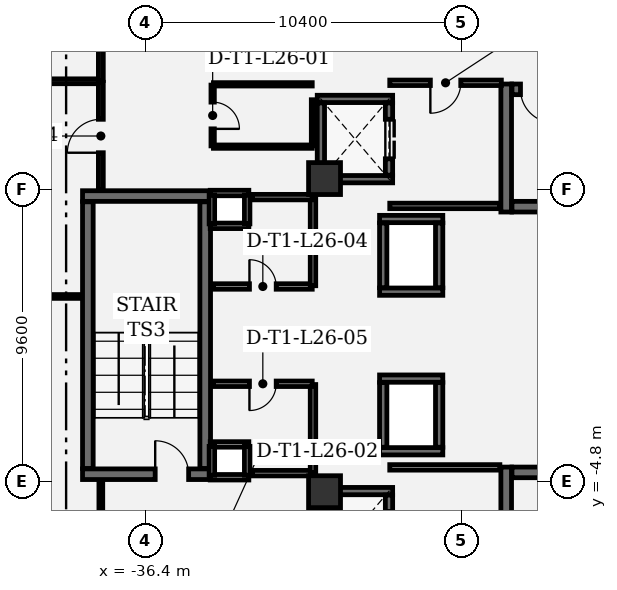
"""IFC4 building model, lengths in metres.
Left out: names, types, materials, properties, quantities, classifications, styles, units other than length and angle.
Written with IfcOpenShell. Run it as: python <this file> out.ifc"""

import sys

from ifc_helpers import new_model, si_unit, direction, frame, frame_2d, origin, origin_2d, place, context, subcontext, project, spatial, rectangle, extrude, element, fill, save


model = new_model("IFC4")
c1 = context("Model", 3, precision=1e-05, world=origin(), true_north=direction((0.0, 1.0)))
c2 = subcontext(c1, "Body", "Model", "MODEL_VIEW")
j1 = project(units=[si_unit("LENGTHUNIT", "METRE"), si_unit("PLANEANGLEUNIT", "RADIAN")], contexts=[c1])
p1 = place(None, origin())
s1 = spatial("IfcSite", under=j1, at=p1, CompositionType="ELEMENT")
p2 = place(p1, origin())
s2 = spatial("IfcBuilding", under=s1, at=p2, CompositionType="ELEMENT")
p3 = place(p2, frame((0.0, 0.0, 117.9)))
s3 = spatial("IfcBuildingStorey", under=s2, at=p3, CompositionType="ELEMENT", Elevation=117.9)
for number, where, z_axis, x_axis in (
    (1, (-30.5, 5.15, 0.0), (0.0, 0.0, 1.0), (1.0, 0.0, 0.0)),
    (2, (-30.5, -5.15, 0.0), (0.0, 0.0, 1.0), (1.0, 0.0, 0.0)),
):
    element("IfcColumn", number, at=place(p3, frame(where, z_axis=z_axis, x_axis=x_axis)), inside=s3, PredefinedType="COLUMN", context=c2, shape_type="SweptSolid", body=[
        extrude(rectangle(XDim=1.05, YDim=1.05, at=origin_2d()), origin(), (0.0, 0.0, 1.0), 4.05),
    ])
p4 = place(p3, frame((-24.525, 8.26, 0.0), z_axis=(0.0, 0.0, 1.0), x_axis=(0.0, -1.0, 0.0)))
e3 = element("IfcWall", 3, at=p4, inside=s3, PredefinedType="SHEAR", context=c2, shape_type="SweptSolid", body=[
    extrude(rectangle(XDim=4.21, YDim=0.35, at=frame_2d((2.105, 0.0))), origin(), (0.0, 0.0, 1.0), 3.77),
])
p5 = place(p3, frame((-24.335, 4.225, 0.0), z_axis=(0.0, 0.0, 1.0), x_axis=(1.0, 0.0, 0.0)))
e4 = element("IfcWall", 4, at=p5, inside=s3, PredefinedType="SHEAR", context=c2, shape_type="SweptSolid", body=[
    extrude(rectangle(XDim=8.12, YDim=0.35, at=frame_2d((4.06, 0.0))), origin(), (0.0, 0.0, 1.0), 3.77),
])
p6 = place(p3, frame((-16.215, 8.085, 0.0), z_axis=(0.0, 0.0, 1.0), x_axis=(-1.0, 0.0, 0.0)))
e5 = element("IfcWall", 5, at=p6, inside=s3, PredefinedType="SHEAR", context=c2, shape_type="SweptSolid", body=[
    extrude(rectangle(XDim=8.12, YDim=0.35, at=frame_2d((4.06, 0.0))), origin(), (0.0, 0.0, 1.0), 3.77),
])
p7 = place(p6, frame((6.74, 0.0, 0.0)))
e6 = element("IfcOpeningElement", 6, at=p7, cuts=e5, PredefinedType="OPENING", context=c2, shape_type="SweptSolid", body=[
    extrude(rectangle(XDim=1.1, YDim=2.2, at=frame_2d((0.55, 1.1))), frame((0.0, 0.185, 0.0), z_axis=(0.0, -1.0, 0.0), x_axis=(1.0, 0.0, 0.0)), (0.0, 0.0, 1.0), 0.37),
])
p8 = place(p3, frame((-24.525, -4.34, 0.0), z_axis=(0.0, 0.0, 1.0), x_axis=(0.0, -1.0, 0.0)))
e7 = element("IfcWall", 7, at=p8, inside=s3, PredefinedType="SHEAR", context=c2, shape_type="SweptSolid", body=[
    extrude(rectangle(XDim=4.21, YDim=0.35, at=frame_2d((2.105, 0.0))), origin(), (0.0, 0.0, 1.0), 3.77),
])
p9 = place(p3, frame((-16.215, -4.515, 0.0), z_axis=(0.0, 0.0, 1.0), x_axis=(-1.0, 0.0, 0.0)))
e8 = element("IfcWall", 8, at=p9, inside=s3, PredefinedType="SHEAR", context=c2, shape_type="SweptSolid", body=[
    extrude(rectangle(XDim=8.12, YDim=0.35, at=frame_2d((4.06, 0.0))), origin(), (0.0, 0.0, 1.0), 3.77),
])
p10 = place(p3, frame((-38.46, -4.575, 0.0), z_axis=(0.0, 0.0, 1.0), x_axis=(1.0, 0.0, 0.0)))
e9 = element("IfcWall", 9, at=p10, inside=s3, PredefinedType="SHEAR", context=c2, shape_type="SweptSolid", body=[
    extrude(rectangle(XDim=4.21, YDim=0.35, at=frame_2d((2.105, 0.0))), origin(), (0.0, 0.0, 1.0), 3.77),
])
p11 = place(p10, frame((2.39, 0.0, 0.0)))
e10 = element("IfcOpeningElement", 10, at=p11, cuts=e9, PredefinedType="OPENING", context=c2, shape_type="SweptSolid", body=[
    extrude(rectangle(XDim=1.1, YDim=2.2, at=frame_2d((0.55, 1.1))), frame((0.0, 0.185, 0.0), z_axis=(0.0, -1.0, 0.0), x_axis=(1.0, 0.0, 0.0)), (0.0, 0.0, 1.0), 0.37),
])
p12 = place(p3, frame((-34.25, 4.575, 0.0), z_axis=(0.0, 0.0, 1.0), x_axis=(-1.0, 0.0, 0.0)))
e11 = element("IfcWall", 11, at=p12, inside=s3, PredefinedType="SHEAR", context=c2, shape_type="SweptSolid", body=[
    extrude(rectangle(XDim=4.21, YDim=0.35, at=frame_2d((2.105, 0.0))), origin(), (0.0, 0.0, 1.0), 3.77),
])
for number, where, z_axis, x_axis in (
    (12, (-34.425, -4.385, 0.0), (0.0, 0.0, 1.0), (0.0, 1.0, 0.0)),
    (13, (-38.285, 4.385, 0.0), (0.0, 0.0, 1.0), (0.0, -1.0, 0.0)),
):
    element("IfcWall", number, at=place(p3, frame(where, z_axis=z_axis, x_axis=x_axis)), inside=s3, PredefinedType="SHEAR", context=c2, shape_type="SweptSolid", body=[
        extrude(rectangle(XDim=8.77, YDim=0.35, at=frame_2d((4.385, 0.0))), origin(), (0.0, 0.0, 1.0), 3.77),
    ])
for number, where, z_axis, x_axis in (
    (14, (-28.26, 5.13, 0.0), (0.0, 0.0, 1.0), (-1.0, 0.0, 0.0)),
    (15, (-30.74, 7.77, 0.0), (0.0, 0.0, 1.0), (1.0, 0.0, 0.0)),
):
    element("IfcWall", number, at=place(p3, frame(where, z_axis=z_axis, x_axis=x_axis)), inside=s3, PredefinedType="SHEAR", context=c2, shape_type="SweptSolid", body=[
        extrude(rectangle(XDim=2.48, YDim=0.24, at=frame_2d((1.24, 0.0))), origin(), (0.0, 0.0, 1.0), 3.77),
    ])
p13 = place(p3, frame((-30.62, 5.262, 0.0), z_axis=(0.0, 0.0, 1.0), x_axis=(0.0, 1.0, 0.0)))
e16 = element("IfcWall", 16, at=p13, inside=s3, PredefinedType="SHEAR", context=c2, shape_type="SweptSolid", body=[
    extrude(rectangle(XDim=2.376, YDim=0.24, at=frame_2d((1.188, 0.0))), origin(), (0.0, 0.0, 1.0), 3.77),
])
p14 = place(p3, frame((-28.38, 7.638, 0.0), z_axis=(0.0, 0.0, 1.0), x_axis=(0.0, -1.0, 0.0)))
e17 = element("IfcWall", 17, at=p14, inside=s3, PredefinedType="SHEAR", context=c2, shape_type="SweptSolid", body=[
    extrude(rectangle(XDim=2.376, YDim=0.24, at=frame_2d((1.188, 0.0))), origin(), (0.0, 0.0, 1.0), 3.77),
])
p15 = place(p14, frame((0.538, 0.0, 0.0)))
e18 = element("IfcOpeningElement", 18, at=p15, cuts=e17, PredefinedType="OPENING", context=c2, shape_type="SweptSolid", body=[
    extrude(rectangle(XDim=1.3, YDim=2.3, at=frame_2d((0.65, 1.15))), frame((0.0, 0.13, 0.0), z_axis=(0.0, -1.0, 0.0), x_axis=(1.0, 0.0, 0.0)), (0.0, 0.0, 1.0), 0.26),
])
p16 = place(p3, frame((-30.74, -5.13, 0.0), z_axis=(0.0, 0.0, 1.0), x_axis=(1.0, 0.0, 0.0)))
e19 = element("IfcWall", 19, at=p16, inside=s3, PredefinedType="SHEAR", context=c2, shape_type="SweptSolid", body=[
    extrude(rectangle(XDim=2.48, YDim=0.24, at=frame_2d((1.24, 0.0))), origin(), (0.0, 0.0, 1.0), 3.77),
])
p17 = place(p3, frame((-30.62, -7.638, 0.0), z_axis=(0.0, 0.0, 1.0), x_axis=(0.0, 1.0, 0.0)))
e20 = element("IfcWall", 20, at=p17, inside=s3, PredefinedType="SHEAR", context=c2, shape_type="SweptSolid", body=[
    extrude(rectangle(XDim=2.376, YDim=0.24, at=frame_2d((1.188, 0.0))), origin(), (0.0, 0.0, 1.0), 3.77),
])
p18 = place(p3, frame((-28.38, -5.262, 0.0), z_axis=(0.0, 0.0, 1.0), x_axis=(0.0, -1.0, 0.0)))
e21 = element("IfcWall", 21, at=p18, inside=s3, PredefinedType="SHEAR", context=c2, shape_type="SweptSolid", body=[
    extrude(rectangle(XDim=2.376, YDim=0.24, at=frame_2d((1.188, 0.0))), origin(), (0.0, 0.0, 1.0), 3.77),
])
p19 = place(p18, frame((0.538, 0.0, 0.0)))
e22 = element("IfcOpeningElement", 22, at=p19, cuts=e21, PredefinedType="OPENING", context=c2, shape_type="SweptSolid", body=[
    extrude(rectangle(XDim=1.3, YDim=2.3, at=frame_2d((0.65, 1.15))), frame((0.0, 0.13, 0.0), z_axis=(0.0, -1.0, 0.0), x_axis=(1.0, 0.0, 0.0)), (0.0, 0.0, 1.0), 0.26),
])
for number, where, z_axis, x_axis in (
    (23, (-26.61, 1.43, 0.0), (0.0, 0.0, 1.0), (-1.0, 0.0, 0.0)),
    (24, (-28.69, 3.82, 0.0), (0.0, 0.0, 1.0), (1.0, 0.0, 0.0)),
):
    element("IfcWall", number, at=place(p3, frame(where, z_axis=z_axis, x_axis=x_axis)), inside=s3, PredefinedType="SHEAR", context=c2, shape_type="SweptSolid", body=[
        extrude(rectangle(XDim=2.08, YDim=0.24, at=frame_2d((1.04, 0.0))), origin(), (0.0, 0.0, 1.0), 3.77),
    ])
for number, where, z_axis, x_axis in (
    (25, (-28.57, 1.562, 0.0), (0.0, 0.0, 1.0), (0.0, 1.0, 0.0)),
    (26, (-26.73, 3.688, 0.0), (0.0, 0.0, 1.0), (0.0, -1.0, 0.0)),
):
    element("IfcWall", number, at=place(p3, frame(where, z_axis=z_axis, x_axis=x_axis)), inside=s3, PredefinedType="SHEAR", context=c2, shape_type="SweptSolid", body=[
        extrude(rectangle(XDim=2.126, YDim=0.24, at=frame_2d((1.063, 0.0))), origin(), (0.0, 0.0, 1.0), 3.77),
    ])
for number, where, z_axis, x_axis in (
    (27, (-26.61, -3.82, 0.0), (0.0, 0.0, 1.0), (-1.0, 0.0, 0.0)),
    (28, (-28.69, -1.43, 0.0), (0.0, 0.0, 1.0), (1.0, 0.0, 0.0)),
):
    element("IfcWall", number, at=place(p3, frame(where, z_axis=z_axis, x_axis=x_axis)), inside=s3, PredefinedType="SHEAR", context=c2, shape_type="SweptSolid", body=[
        extrude(rectangle(XDim=2.08, YDim=0.24, at=frame_2d((1.04, 0.0))), origin(), (0.0, 0.0, 1.0), 3.77),
    ])
for number, where, z_axis, x_axis in (
    (29, (-28.57, -3.688, 0.0), (0.0, 0.0, 1.0), (0.0, 1.0, 0.0)),
    (30, (-26.73, -1.562, 0.0), (0.0, 0.0, 1.0), (0.0, -1.0, 0.0)),
):
    element("IfcWall", number, at=place(p3, frame(where, z_axis=z_axis, x_axis=x_axis)), inside=s3, PredefinedType="SHEAR", context=c2, shape_type="SweptSolid", body=[
        extrude(rectangle(XDim=2.126, YDim=0.24, at=frame_2d((1.063, 0.0))), origin(), (0.0, 0.0, 1.0), 3.77),
    ])
for number, where, z_axis, x_axis in (
    (31, (-32.99, 3.595, 0.0), (0.0, 0.0, 1.0), (-1.0, 0.0, 0.0)),
    (32, (-34.26, 4.675, 0.0), (0.0, 0.0, 1.0), (1.0, 0.0, 0.0)),
):
    element("IfcWall", number, at=place(p3, frame(where, z_axis=z_axis, x_axis=x_axis)), inside=s3, PredefinedType="PARTITIONING", context=c2, shape_type="SweptSolid", body=[
        extrude(rectangle(XDim=1.27, YDim=0.18, at=frame_2d((0.635, 0.0))), origin(), (0.0, 0.0, 1.0), 3.77),
    ])
for number, where, z_axis, x_axis in (
    (33, (-34.205, 3.66, 0.0), (0.0, 0.0, 1.0), (0.0, 1.0, 0.0)),
    (34, (-33.045, 4.61, 0.0), (0.0, 0.0, 1.0), (0.0, -1.0, 0.0)),
):
    element("IfcWall", number, at=place(p3, frame(where, z_axis=z_axis, x_axis=x_axis)), inside=s3, PredefinedType="PARTITIONING", context=c2, shape_type="SweptSolid", body=[
        extrude(rectangle(XDim=0.95, YDim=0.18, at=frame_2d((0.475, 0.0))), origin(), (0.0, 0.0, 1.0), 3.77),
    ])
for number, where, z_axis, x_axis in (
    (35, (-32.99, -4.675, 0.0), (0.0, 0.0, 1.0), (-1.0, 0.0, 0.0)),
    (36, (-34.26, -3.595, 0.0), (0.0, 0.0, 1.0), (1.0, 0.0, 0.0)),
):
    element("IfcWall", number, at=place(p3, frame(where, z_axis=z_axis, x_axis=x_axis)), inside=s3, PredefinedType="PARTITIONING", context=c2, shape_type="SweptSolid", body=[
        extrude(rectangle(XDim=1.27, YDim=0.18, at=frame_2d((0.635, 0.0))), origin(), (0.0, 0.0, 1.0), 3.77),
    ])
for number, where, z_axis, x_axis in (
    (37, (-34.205, -4.61, 0.0), (0.0, 0.0, 1.0), (0.0, 1.0, 0.0)),
    (38, (-33.045, -3.66, 0.0), (0.0, 0.0, 1.0), (0.0, -1.0, 0.0)),
):
    element("IfcWall", number, at=place(p3, frame(where, z_axis=z_axis, x_axis=x_axis)), inside=s3, PredefinedType="PARTITIONING", context=c2, shape_type="SweptSolid", body=[
        extrude(rectangle(XDim=0.95, YDim=0.18, at=frame_2d((0.475, 0.0))), origin(), (0.0, 0.0, 1.0), 3.77),
    ])
p20 = place(p3, frame((-28.355, 4.25, 0.0), z_axis=(0.0, 0.0, 1.0), x_axis=(1.0, 0.0, 0.0)))
e39 = element("IfcWall", 39, at=p20, inside=s3, PredefinedType="PARTITIONING", context=c2, shape_type="SweptSolid", body=[
    extrude(rectangle(XDim=3.622, YDim=0.18, at=frame_2d((1.811, 0.0))), origin(), (0.0, 0.0, 1.0), 3.77),
])
p21 = place(p3, frame((-24.684, 8.3, 0.0), z_axis=(0.0, 0.0, 1.0), x_axis=(-1.0, 0.0, 0.0)))
e40 = element("IfcWall", 40, at=p21, inside=s3, PredefinedType="PARTITIONING", context=c2, shape_type="SweptSolid", body=[
    extrude(rectangle(XDim=3.671, YDim=0.18, at=frame_2d((1.835, 0.0))), origin(), (0.0, 0.0, 1.0), 3.77),
])
p22 = place(p21, frame((1.335, 0.0, 0.0)))
e41 = element("IfcOpeningElement", 41, at=p22, cuts=e40, PredefinedType="OPENING", context=c2, shape_type="SweptSolid", body=[
    extrude(rectangle(XDim=1.0, YDim=2.15, at=frame_2d((0.5, 1.075))), frame((0.0, 0.1, 0.0), z_axis=(0.0, -1.0, 0.0), x_axis=(1.0, 0.0, 0.0)), (0.0, 0.0, 1.0), 0.2),
])
p23 = place(p3, frame((-24.733, -4.35, 0.0), z_axis=(0.0, 0.0, 1.0), x_axis=(-1.0, 0.0, 0.0)))
e42 = element("IfcWall", 42, at=p23, inside=s3, PredefinedType="PARTITIONING", context=c2, shape_type="SweptSolid", body=[
    extrude(rectangle(XDim=3.622, YDim=0.18, at=frame_2d((1.811, 0.0))), origin(), (0.0, 0.0, 1.0), 3.77),
])
p24 = place(p3, frame((-34.18, 8.225, 0.0), z_axis=(0.0, 0.0, 1.0), x_axis=(0.0, -1.0, 0.0)))
e43 = element("IfcWall", 43, at=p24, inside=s3, PredefinedType="PARTITIONING", context=c2, shape_type="SweptSolid", body=[
    extrude(rectangle(XDim=2.0, YDim=0.11, at=frame_2d((1.0, 0.0))), origin(), (0.0, 0.0, 1.0), 3.77),
])
p25 = place(p24, frame((0.56, 0.0, 0.0)))
e44 = element("IfcOpeningElement", 44, at=p25, cuts=e43, PredefinedType="OPENING", context=c2, shape_type="SweptSolid", body=[
    extrude(rectangle(XDim=0.88, YDim=2.1, at=frame_2d((0.44, 1.05))), frame((0.0, 0.065, 0.0), z_axis=(0.0, -1.0, 0.0), x_axis=(1.0, 0.0, 0.0)), (0.0, 0.0, 1.0), 0.13),
])
p26 = place(p3, frame((-34.155, 6.2, 0.0), z_axis=(0.0, 0.0, 1.0), x_axis=(1.0, 0.0, 0.0)))
e45 = element("IfcWall", 45, at=p26, inside=s3, PredefinedType="PARTITIONING", context=c2, shape_type="SweptSolid", body=[
    extrude(rectangle(XDim=3.25, YDim=0.11, at=frame_2d((1.625, 0.0))), origin(), (0.0, 0.0, 1.0), 3.334),
])
p27 = place(p3, frame((-30.88, 6.225, 0.0), z_axis=(0.0, 0.0, 1.0), x_axis=(0.0, 1.0, 0.0)))
e46 = element("IfcWall", 46, at=p27, inside=s3, PredefinedType="PARTITIONING", context=c2, shape_type="SweptSolid", body=[
    extrude(rectangle(XDim=1.518, YDim=0.11, at=frame_2d((0.759, 0.0))), origin(), (0.0, 0.0, 1.0), 3.77),
])
p28 = place(p3, frame((-30.905, 8.25, 0.0), z_axis=(0.0, 0.0, 1.0), x_axis=(-1.0, 0.0, 0.0)))
e47 = element("IfcWall", 47, at=p28, inside=s3, PredefinedType="PARTITIONING", context=c2, shape_type="SweptSolid", body=[
    extrude(rectangle(XDim=3.25, YDim=0.11, at=frame_2d((1.625, 0.0))), origin(), (0.0, 0.0, 1.0), 3.77),
])
p29 = place(p3, frame((-34.155, 1.6, 0.0), z_axis=(0.0, 0.0, 1.0), x_axis=(1.0, 0.0, 0.0)))
e48 = element("IfcWall", 48, at=p29, inside=s3, PredefinedType="PARTITIONING", context=c2, shape_type="SweptSolid", body=[
    extrude(rectangle(XDim=3.25, YDim=0.18, at=frame_2d((1.625, 0.0))), origin(), (0.0, 0.0, 1.0), 3.77),
])
p30 = place(p29, frame((1.185, 0.0, 0.0)))
e49 = element("IfcOpeningElement", 49, at=p30, cuts=e48, PredefinedType="OPENING", context=c2, shape_type="SweptSolid", body=[
    extrude(rectangle(XDim=0.88, YDim=2.1, at=frame_2d((0.44, 1.05))), frame((0.0, 0.1, 0.0), z_axis=(0.0, -1.0, 0.0), x_axis=(1.0, 0.0, 0.0)), (0.0, 0.0, 1.0), 0.2),
])
p31 = place(p3, frame((-30.88, 1.625, 0.0), z_axis=(0.0, 0.0, 1.0), x_axis=(0.0, 1.0, 0.0)))
e50 = element("IfcWall", 50, at=p31, inside=s3, PredefinedType="PARTITIONING", context=c2, shape_type="SweptSolid", body=[
    extrude(rectangle(XDim=2.89, YDim=0.18, at=frame_2d((1.445, 0.0))), origin(), (0.0, 0.0, 1.0), 3.77),
])
for number, where, z_axis, x_axis in (
    (51, (-30.905, 4.54, 0.0), (0.0, 0.0, 1.0), (-1.0, 0.0, 0.0)),
    (52, (-32.88, -4.54, 0.0), (0.0, 0.0, 1.0), (1.0, 0.0, 0.0)),
):
    element("IfcWall", number, at=place(p3, frame(where, z_axis=z_axis, x_axis=x_axis)), inside=s3, PredefinedType="PARTITIONING", context=c2, shape_type="SweptSolid", body=[
        extrude(rectangle(XDim=1.975, YDim=0.18, at=frame_2d((0.988, 0.0))), origin(), (0.0, 0.0, 1.0), 3.77),
    ])
p32 = place(p3, frame((-30.88, -4.515, 0.0), z_axis=(0.0, 0.0, 1.0), x_axis=(0.0, 1.0, 0.0)))
e53 = element("IfcWall", 53, at=p32, inside=s3, PredefinedType="PARTITIONING", context=c2, shape_type="SweptSolid", body=[
    extrude(rectangle(XDim=2.89, YDim=0.18, at=frame_2d((1.445, 0.0))), origin(), (0.0, 0.0, 1.0), 3.77),
])
p33 = place(p3, frame((-30.905, -1.6, 0.0), z_axis=(0.0, 0.0, 1.0), x_axis=(-1.0, 0.0, 0.0)))
e54 = element("IfcWall", 54, at=p33, inside=s3, PredefinedType="PARTITIONING", context=c2, shape_type="SweptSolid", body=[
    extrude(rectangle(XDim=3.25, YDim=0.18, at=frame_2d((1.625, 0.0))), origin(), (0.0, 0.0, 1.0), 3.77),
])
p34 = place(p33, frame((1.185, 0.0, 0.0)))
e55 = element("IfcOpeningElement", 55, at=p34, cuts=e54, PredefinedType="OPENING", context=c2, shape_type="SweptSolid", body=[
    extrude(rectangle(XDim=0.88, YDim=2.1, at=frame_2d((0.44, 1.05))), frame((0.0, 0.1, 0.0), z_axis=(0.0, -1.0, 0.0), x_axis=(1.0, 0.0, 0.0)), (0.0, 0.0, 1.0), 0.2),
])
p35 = place(p3, frame((-50.766, 8.35, 0.0), z_axis=(0.0, 0.0, 1.0), x_axis=(1.0, 0.0, 0.0)))
e56 = element("IfcWall", 56, at=p35, inside=s3, PredefinedType="PARTITIONING", context=c2, shape_type="SweptSolid", body=[
    extrude(rectangle(XDim=12.883, YDim=0.16, at=frame_2d((6.442, 0.0))), origin(), (0.0, 0.0, 1.0), 2.89),
])
p36 = place(p3, frame((-37.858, 10.733, 0.0), z_axis=(0.0, 0.0, 1.0), x_axis=(0.0, -1.0, 0.0)))
e57 = element("IfcWall", 57, at=p36, inside=s3, PredefinedType="PARTITIONING", context=c2, shape_type="SweptSolid", body=[
    extrude(rectangle(XDim=2.358, YDim=0.16, at=frame_2d((1.179, 0.0))), origin(), (0.0, 0.0, 1.0), 3.77),
])
p37 = place(p3, frame((-37.858, -8.517, 0.0), z_axis=(0.0, 0.0, 1.0), x_axis=(0.0, 1.0, 0.0)))
e58 = element("IfcWall", 58, at=p37, inside=s3, PredefinedType="PARTITIONING", context=c2, shape_type="SweptSolid", body=[
    extrude(rectangle(XDim=3.734, YDim=0.125, at=frame_2d((1.867, 0.0))), origin(), (0.0, 0.0, 1.0), 3.77),
])
p38 = place(p37, frame((1.392, 0.0, 0.0)))
e59 = element("IfcOpeningElement", 59, at=p38, cuts=e58, PredefinedType="OPENING", context=c2, shape_type="SweptSolid", body=[
    extrude(rectangle(XDim=0.95, YDim=2.15, at=frame_2d((0.475, 1.075))), frame((0.0, 0.073, 0.0), z_axis=(0.0, -1.0, 0.0), x_axis=(1.0, 0.0, 0.0)), (0.0, 0.0, 1.0), 0.145),
])
p39 = place(p3, frame((-38.493, 1.271, 0.0), z_axis=(0.0, 0.0, 1.0), x_axis=(-0.999999998722, 5.0556756e-05, 0.0)))
e60 = element("IfcWall", 60, at=p39, inside=s3, PredefinedType="PARTITIONING", context=c2, shape_type="SweptSolid", body=[
    extrude(rectangle(XDim=19.316, YDim=0.125, at=frame_2d((9.658, 0.0))), origin(), (0.0, 0.0, 1.0), 3.77),
])
p40 = place(p3, frame((-37.858, 4.783, 0.0), z_axis=(0.0, 0.0, 1.0), x_axis=(0.0, 1.0, 0.0)))
e61 = element("IfcWall", 61, at=p40, inside=s3, PredefinedType="PARTITIONING", context=c2, shape_type="SweptSolid", body=[
    extrude(rectangle(XDim=3.534, YDim=0.16, at=frame_2d((1.767, 0.0))), origin(), (0.0, 0.0, 1.0), 3.77),
])
p41 = place(p40, frame((1.217, 0.0, 0.0)))
e62 = element("IfcOpeningElement", 62, at=p41, cuts=e61, PredefinedType="OPENING", context=c2, shape_type="SweptSolid", body=[
    extrude(rectangle(XDim=1.1, YDim=2.15, at=frame_2d((0.55, 1.075))), frame((0.0, 0.09, 0.0), z_axis=(0.0, -1.0, 0.0), x_axis=(1.0, 0.0, 0.0)), (0.0, 0.0, 1.0), 0.18),
])
p42 = place(p7, origin())
e63 = element("IfcDoor", 63, at=p42, inside=s3, OperationType="SINGLE_SWING_LEFT", PredefinedType="DOOR", context=c2, shape_type="SweptSolid", body=[
    extrude(rectangle(XDim=1.1, YDim=2.2, at=frame_2d((0.55, 1.1))), frame((0.0, 0.025, 0.0), z_axis=(0.0, -1.0, 0.0), x_axis=(1.0, 0.0, 0.0)), (0.0, 0.0, 1.0), 0.05),
])
fill(e6, e63)
p43 = place(p11, origin())
e64 = element("IfcDoor", 64, at=p43, inside=s3, OperationType="SINGLE_SWING_LEFT", PredefinedType="DOOR", context=c2, shape_type="SweptSolid", body=[
    extrude(rectangle(XDim=1.1, YDim=2.2, at=frame_2d((0.55, 1.1))), frame((0.0, 0.025, 0.0), z_axis=(0.0, -1.0, 0.0), x_axis=(1.0, 0.0, 0.0)), (0.0, 0.0, 1.0), 0.05),
])
fill(e10, e64)
p44 = place(p15, origin())
e65 = element("IfcDoor", 65, at=p44, inside=s3, OperationType="DOUBLE_DOOR_SLIDING", PredefinedType="DOOR", context=c2, shape_type="SweptSolid", body=[
    extrude(rectangle(XDim=1.3, YDim=2.3, at=frame_2d((0.65, 1.15))), frame((0.0, 0.025, 0.0), z_axis=(0.0, -1.0, 0.0), x_axis=(1.0, 0.0, 0.0)), (0.0, 0.0, 1.0), 0.05),
])
fill(e18, e65)
p45 = place(p25, origin())
e66 = element("IfcDoor", 66, at=p45, inside=s3, OperationType="SINGLE_SWING_RIGHT", PredefinedType="DOOR", context=c2, shape_type="SweptSolid", body=[
    extrude(rectangle(XDim=0.88, YDim=2.1, at=frame_2d((0.44, 1.05))), frame((0.0, 0.025, 0.0), z_axis=(0.0, -1.0, 0.0), x_axis=(1.0, 0.0, 0.0)), (0.0, 0.0, 1.0), 0.05),
])
fill(e44, e66)
p46 = place(p30, origin())
e67 = element("IfcDoor", 67, at=p46, inside=s3, OperationType="SINGLE_SWING_LEFT", PredefinedType="DOOR", context=c2, shape_type="SweptSolid", body=[
    extrude(rectangle(XDim=0.88, YDim=2.1, at=frame_2d((0.44, 1.05))), frame((0.0, 0.025, 0.0), z_axis=(0.0, -1.0, 0.0), x_axis=(1.0, 0.0, 0.0)), (0.0, 0.0, 1.0), 0.05),
])
fill(e49, e67)
p47 = place(p34, origin())
e68 = element("IfcDoor", 68, at=p47, inside=s3, OperationType="SINGLE_SWING_RIGHT", PredefinedType="DOOR", context=c2, shape_type="SweptSolid", body=[
    extrude(rectangle(XDim=0.88, YDim=2.1, at=frame_2d((0.44, 1.05))), frame((0.0, 0.025, 0.0), z_axis=(0.0, -1.0, 0.0), x_axis=(1.0, 0.0, 0.0)), (0.0, 0.0, 1.0), 0.05),
])
fill(e55, e68)
p48 = place(p41, origin())
e69 = element("IfcDoor", 69, at=p48, inside=s3, OperationType="SINGLE_SWING_LEFT", PredefinedType="DOOR", context=c2, shape_type="SweptSolid", body=[
    extrude(rectangle(XDim=1.1, YDim=2.15, at=frame_2d((0.55, 1.075))), frame((0.0, 0.025, 0.0), z_axis=(0.0, -1.0, 0.0), x_axis=(1.0, 0.0, 0.0)), (0.0, 0.0, 1.0), 0.05),
])
fill(e62, e69)
p49 = place(p22, origin())
e70 = element("IfcDoor", 70, at=p49, inside=s3, OperationType="SINGLE_SWING_RIGHT", PredefinedType="DOOR", context=c2, shape_type="SweptSolid", body=[
    extrude(rectangle(XDim=1.0, YDim=2.15, at=frame_2d((0.5, 1.075))), frame((0.0, 0.025, 0.0), z_axis=(0.0, -1.0, 0.0), x_axis=(1.0, 0.0, 0.0)), (0.0, 0.0, 1.0), 0.05),
])
fill(e41, e70)
save(model, sys.argv[1])
